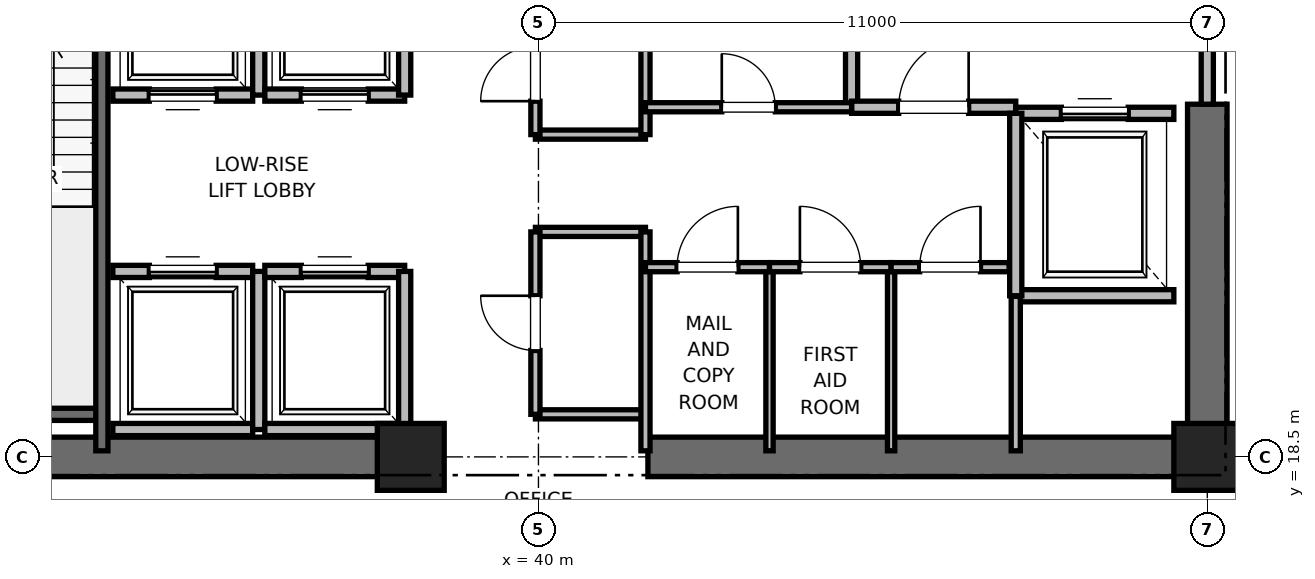
"""IFC4 building model, lengths in metres.
Left out: names, types, materials, properties, quantities, classifications, styles, units other than length and angle.
Written with IfcOpenShell. Run it as: python <this file> out.ifc"""

import sys

from ifc_helpers import new_model, si_unit, direction, frame, frame_2d, origin, origin_2d, place, context, subcontext, project, spatial, rectangle, extrude, element, fill, save


model = new_model("IFC4")
c1 = context("Model", 3, precision=1e-05, world=origin(), true_north=direction((0.0, 1.0)))
c2 = subcontext(c1, "Body", "Model", "MODEL_VIEW")
j1 = project(units=[si_unit("LENGTHUNIT", "METRE"), si_unit("PLANEANGLEUNIT", "RADIAN")], contexts=[c1])
p1 = place(None, origin())
s1 = spatial("IfcSite", under=j1, at=p1, CompositionType="ELEMENT")
p2 = place(p1, origin())
s2 = spatial("IfcBuilding", under=s1, at=p2, CompositionType="ELEMENT")
p3 = place(p2, frame((0.0, 0.0, 39.6)))
s3 = spatial("IfcBuildingStorey", under=s2, at=p3, CompositionType="ELEMENT", Elevation=39.6)
for number, where, z_axis, x_axis in (
    (1, (51.0, 18.5, 0.0), (0.0, 0.0, 1.0), (1.0, 0.0, 0.0)),
    (2, (37.9, 18.5, 0.0), (0.0, 0.0, 1.0), (1.0, 0.0, 0.0)),
):
    element("IfcColumn", number, at=place(p3, frame(where, z_axis=z_axis, x_axis=x_axis)), inside=s3, PredefinedType="PILASTER", context=c2, shape_type="SweptSolid", body=[
        extrude(rectangle(XDim=1.1, YDim=1.1, at=origin_2d()), origin(), (0.0, 0.0, 1.0), 4.0),
    ])
for number, where, z_axis, x_axis in (
    (3, (29.0, 18.5, 0.0), (0.0, 0.0, 1.0), (1.0, 0.0, 0.0)),
    (4, (41.8, 18.5, 0.0), (0.0, 0.0, 1.0), (1.0, 0.0, 0.0)),
):
    element("IfcWall", number, at=place(p3, frame(where, z_axis=z_axis, x_axis=x_axis)), inside=s3, PredefinedType="SHEAR", context=c2, shape_type="SweptSolid", body=[
        extrude(rectangle(XDim=9.2, YDim=0.65, at=frame_2d((4.6, 0.0))), origin(), (0.0, 0.0, 1.0), 3.76),
    ])
p4 = place(p3, frame((51.0, 18.5, 0.0), z_axis=(0.0, 0.0, 1.0), x_axis=(0.0, 1.0, 0.0)))
e5 = element("IfcWall", 5, at=p4, inside=s3, PredefinedType="SHEAR", context=c2, shape_type="SweptSolid", body=[
    extrude(rectangle(XDim=5.8, YDim=0.65, at=frame_2d((2.9, 0.0))), origin(), (0.0, 0.0, 1.0), 3.76),
])
p5 = place(p3, frame((29.7, 19.2, 0.0), z_axis=(0.0, 0.0, 1.0), x_axis=(1.0, 0.0, 0.0)))
e6 = element("IfcWall", 6, at=p5, inside=s3, PredefinedType="SOLIDWALL", context=c2, shape_type="SweptSolid", body=[
    extrude(rectangle(XDim=3.12, YDim=0.2, at=frame_2d((1.56, 0.0))), origin(), (0.0, 0.0, 1.0), 3.76),
])
p6 = place(p3, frame((32.82, 18.6, 0.0), z_axis=(0.0, 0.0, 1.0), x_axis=(0.0, 1.0, 0.0)))
e7 = element("IfcWall", 7, at=p6, inside=s3, PredefinedType="SOLIDWALL", context=c2, shape_type="SweptSolid", body=[
    extrude(rectangle(XDim=8.78, YDim=0.2, at=frame_2d((4.39, 0.0))), origin(), (0.0, 0.0, 1.0), 3.76),
])
p7 = place(p3, frame((45.15, 24.25, 0.0), z_axis=(0.0, 0.0, 1.0), x_axis=(0.0, 1.0, 0.0)))
e8 = element("IfcWall", 8, at=p7, inside=s3, PredefinedType="PARTITIONING", context=c2, shape_type="SweptSolid", body=[
    extrude(rectangle(XDim=3.37, YDim=0.2, at=frame_2d((1.685, 0.0))), origin(), (0.0, 0.0, 1.0), 3.76),
])
p8 = place(p3, frame((45.15, 24.25, 0.0), z_axis=(0.0, 0.0, 1.0), x_axis=(1.0, 0.0, 0.0)))
e9 = element("IfcWall", 9, at=p8, inside=s3, PredefinedType="PARTITIONING", context=c2, shape_type="SweptSolid", body=[
    extrude(rectangle(XDim=2.7, YDim=0.2, at=frame_2d((1.35, 0.0))), origin(), (0.0, 0.0, 1.0), 3.76),
])
p9 = place(p8, frame((0.775, 0.0, 0.0)))
e10 = element("IfcOpeningElement", 10, at=p9, cuts=e9, PredefinedType="OPENING", context=c2, shape_type="SweptSolid", body=[
    extrude(rectangle(XDim=1.15, YDim=2.2, at=frame_2d((0.575, 1.1))), frame((0.0, 0.1, 0.0), z_axis=(0.0, -1.0, 0.0), x_axis=(1.0, 0.0, 0.0)), (0.0, 0.0, 1.0), 0.2),
])
p10 = place(p3, frame((51.0, 24.3, 0.0), z_axis=(0.0, 0.0, 1.0), x_axis=(0.0, 1.0, 0.0)))
e11 = element("IfcWall", 11, at=p10, inside=s3, PredefinedType="PARTITIONING", context=c2, shape_type="SweptSolid", body=[
    extrude(rectangle(XDim=3.4, YDim=0.2, at=frame_2d((1.7, 0.0))), origin(), (0.0, 0.0, 1.0), 2.54),
])
p11 = place(p10, frame((1.125, 0.0, 0.0)))
e12 = element("IfcOpeningElement", 12, at=p11, cuts=e11, PredefinedType="OPENING", context=c2, shape_type="SweptSolid", body=[
    extrude(rectangle(XDim=1.15, YDim=2.2, at=frame_2d((0.575, 1.1))), frame((0.0, 0.1, 0.0), z_axis=(0.0, -1.0, 0.0), x_axis=(1.0, 0.0, 0.0)), (0.0, 0.0, 1.0), 0.2),
])
p12 = place(p3, frame((47.85, 21.15, 0.0), z_axis=(0.0, 0.0, 1.0), x_axis=(1.0, 0.0, 0.0)))
e13 = element("IfcWall", 13, at=p12, inside=s3, PredefinedType="SOLIDWALL", context=c2, shape_type="SweptSolid", body=[
    extrude(rectangle(XDim=2.6, YDim=0.2, at=frame_2d((1.3, 0.0))), origin(), (0.0, 0.0, 1.0), 3.76),
])
p13 = place(p3, frame((50.45, 24.15, 0.0), z_axis=(0.0, 0.0, 1.0), x_axis=(-1.0, 0.0, 0.0)))
e14 = element("IfcWall", 14, at=p13, inside=s3, PredefinedType="SOLIDWALL", context=c2, shape_type="SweptSolid", body=[
    extrude(rectangle(XDim=2.6, YDim=0.2, at=frame_2d((1.3, 0.0))), origin(), (0.0, 0.0, 1.0), 2.54),
])
p14 = place(p13, frame((0.75, 0.0, 0.0)))
e15 = element("IfcOpeningElement", 15, at=p14, cuts=e14, PredefinedType="OPENING", context=c2, shape_type="SweptSolid", body=[
    extrude(rectangle(XDim=1.1, YDim=2.2, at=frame_2d((0.55, 1.1))), frame((0.0, 0.1, 0.0), z_axis=(0.0, -1.0, 0.0), x_axis=(1.0, 0.0, 0.0)), (0.0, 0.0, 1.0), 0.2),
])
p15 = place(p3, frame((47.85, 24.15, 0.0), z_axis=(0.0, 0.0, 1.0), x_axis=(0.0, -1.0, 0.0)))
e16 = element("IfcWall", 16, at=p15, inside=s3, PredefinedType="SOLIDWALL", context=c2, shape_type="SweptSolid", body=[
    extrude(rectangle(XDim=3.0, YDim=0.2, at=frame_2d((1.5, 0.0))), origin(), (0.0, 0.0, 1.0), 3.76),
])
p16 = place(p3, frame((33.0, 18.95, 0.0), z_axis=(0.0, 0.0, 1.0), x_axis=(1.0, 0.0, 0.0)))
e17 = element("IfcWall", 17, at=p16, inside=s3, PredefinedType="SOLIDWALL", context=c2, shape_type="SweptSolid", body=[
    extrude(rectangle(XDim=2.3, YDim=0.2, at=frame_2d((1.15, 0.0))), origin(), (0.0, 0.0, 1.0), 3.76),
])
p17 = place(p3, frame((35.3, 21.55, 0.0), z_axis=(0.0, 0.0, 1.0), x_axis=(-1.0, 0.0, 0.0)))
e18 = element("IfcWall", 18, at=p17, inside=s3, PredefinedType="SOLIDWALL", context=c2, shape_type="SweptSolid", body=[
    extrude(rectangle(XDim=2.3, YDim=0.2, at=frame_2d((1.15, 0.0))), origin(), (0.0, 0.0, 1.0), 3.76),
])
p18 = place(p17, frame((0.6, 0.0, 0.0)))
e19 = element("IfcOpeningElement", 19, at=p18, cuts=e18, PredefinedType="OPENING", context=c2, shape_type="SweptSolid", body=[
    extrude(rectangle(XDim=1.1, YDim=2.2, at=frame_2d((0.55, 1.1))), frame((0.0, 0.1, 0.0), z_axis=(0.0, -1.0, 0.0), x_axis=(1.0, 0.0, 0.0)), (0.0, 0.0, 1.0), 0.2),
])
p19 = place(p3, frame((35.4, 18.95, 0.0), z_axis=(0.0, 0.0, 1.0), x_axis=(0.0, 1.0, 0.0)))
e20 = element("IfcWall", 20, at=p19, inside=s3, PredefinedType="SOLIDWALL", context=c2, shape_type="SweptSolid", body=[
    extrude(rectangle(XDim=2.6, YDim=0.2, at=frame_2d((1.3, 0.0))), origin(), (0.0, 0.0, 1.0), 3.76),
])
p20 = place(p3, frame((35.5, 18.95, 0.0), z_axis=(0.0, 0.0, 1.0), x_axis=(1.0, 0.0, 0.0)))
e21 = element("IfcWall", 21, at=p20, inside=s3, PredefinedType="SOLIDWALL", context=c2, shape_type="SweptSolid", body=[
    extrude(rectangle(XDim=2.3, YDim=0.2, at=frame_2d((1.15, 0.0))), origin(), (0.0, 0.0, 1.0), 2.54),
])
p21 = place(p3, frame((37.8, 21.55, 0.0), z_axis=(0.0, 0.0, 1.0), x_axis=(-1.0, 0.0, 0.0)))
e22 = element("IfcWall", 22, at=p21, inside=s3, PredefinedType="SOLIDWALL", context=c2, shape_type="SweptSolid", body=[
    extrude(rectangle(XDim=2.3, YDim=0.2, at=frame_2d((1.15, 0.0))), origin(), (0.0, 0.0, 1.0), 3.76),
])
p22 = place(p21, frame((0.6, 0.0, 0.0)))
e23 = element("IfcOpeningElement", 23, at=p22, cuts=e22, PredefinedType="OPENING", context=c2, shape_type="SweptSolid", body=[
    extrude(rectangle(XDim=1.1, YDim=2.2, at=frame_2d((0.55, 1.1))), frame((0.0, 0.1, 0.0), z_axis=(0.0, -1.0, 0.0), x_axis=(1.0, 0.0, 0.0)), (0.0, 0.0, 1.0), 0.2),
])
p23 = place(p3, frame((37.8, 18.95, 0.0), z_axis=(0.0, 0.0, 1.0), x_axis=(0.0, 1.0, 0.0)))
e24 = element("IfcWall", 24, at=p23, inside=s3, PredefinedType="SOLIDWALL", context=c2, shape_type="SweptSolid", body=[
    extrude(rectangle(XDim=2.6, YDim=0.2, at=frame_2d((1.3, 0.0))), origin(), (0.0, 0.0, 1.0), 2.54),
])
p24 = place(p3, frame((33.0, 24.45, 0.0), z_axis=(0.0, 0.0, 1.0), x_axis=(1.0, 0.0, 0.0)))
e25 = element("IfcWall", 25, at=p24, inside=s3, PredefinedType="SOLIDWALL", context=c2, shape_type="SweptSolid", body=[
    extrude(rectangle(XDim=2.3, YDim=0.2, at=frame_2d((1.15, 0.0))), origin(), (0.0, 0.0, 1.0), 3.76),
])
p25 = place(p24, frame((0.6, 0.0, 0.0)))
e26 = element("IfcOpeningElement", 26, at=p25, cuts=e25, PredefinedType="OPENING", context=c2, shape_type="SweptSolid", body=[
    extrude(rectangle(XDim=1.1, YDim=2.2, at=frame_2d((0.55, 1.1))), frame((0.0, 0.1, 0.0), z_axis=(0.0, -1.0, 0.0), x_axis=(1.0, 0.0, 0.0)), (0.0, 0.0, 1.0), 0.2),
])
p26 = place(p3, frame((35.4, 24.45, 0.0), z_axis=(0.0, 0.0, 1.0), x_axis=(0.0, 1.0, 0.0)))
e27 = element("IfcWall", 27, at=p26, inside=s3, PredefinedType="SOLIDWALL", context=c2, shape_type="SweptSolid", body=[
    extrude(rectangle(XDim=2.6, YDim=0.2, at=frame_2d((1.3, 0.0))), origin(), (0.0, 0.0, 1.0), 3.76),
])
p27 = place(p3, frame((35.5, 24.45, 0.0), z_axis=(0.0, 0.0, 1.0), x_axis=(1.0, 0.0, 0.0)))
e28 = element("IfcWall", 28, at=p27, inside=s3, PredefinedType="SOLIDWALL", context=c2, shape_type="SweptSolid", body=[
    extrude(rectangle(XDim=2.3, YDim=0.2, at=frame_2d((1.15, 0.0))), origin(), (0.0, 0.0, 1.0), 3.76),
])
p28 = place(p27, frame((0.6, 0.0, 0.0)))
e29 = element("IfcOpeningElement", 29, at=p28, cuts=e28, PredefinedType="OPENING", context=c2, shape_type="SweptSolid", body=[
    extrude(rectangle(XDim=1.1, YDim=2.2, at=frame_2d((0.55, 1.1))), frame((0.0, 0.1, 0.0), z_axis=(0.0, -1.0, 0.0), x_axis=(1.0, 0.0, 0.0)), (0.0, 0.0, 1.0), 0.2),
])
p29 = place(p3, frame((37.8, 24.45, 0.0), z_axis=(0.0, 0.0, 1.0), x_axis=(0.0, 1.0, 0.0)))
e30 = element("IfcWall", 30, at=p29, inside=s3, PredefinedType="SOLIDWALL", context=c2, shape_type="SweptSolid", body=[
    extrude(rectangle(XDim=2.6, YDim=0.2, at=frame_2d((1.3, 0.0))), origin(), (0.0, 0.0, 1.0), 3.76),
])
for number, where, z_axis, x_axis in (
    (31, (39.95, 19.2, 0.0), (0.0, 0.0, 1.0), (1.0, 0.0, 0.0)),
    (32, (39.95, 22.2, 0.0), (0.0, 0.0, 1.0), (1.0, 0.0, 0.0)),
    (33, (39.95, 23.8, 0.0), (0.0, 0.0, 1.0), (1.0, 0.0, 0.0)),
):
    element("IfcWall", number, at=place(p3, frame(where, z_axis=z_axis, x_axis=x_axis)), inside=s3, PredefinedType="PARTITIONING", context=c2, shape_type="SweptSolid", body=[
        extrude(rectangle(XDim=1.81, YDim=0.15, at=frame_2d((0.905, 0.0))), origin(), (0.0, 0.0, 1.0), 2.85),
    ])
p30 = place(p3, frame((41.76, 18.6, 0.0), z_axis=(0.0, 0.0, 1.0), x_axis=(0.0, 1.0, 0.0)))
e34 = element("IfcWall", 34, at=p30, inside=s3, PredefinedType="PARTITIONING", context=c2, shape_type="SweptSolid", body=[
    extrude(rectangle(XDim=3.6, YDim=0.15, at=frame_2d((1.8, 0.0))), origin(), (0.0, 0.0, 1.0), 2.54),
])
p31 = place(p3, frame((41.76, 23.8, 0.0), z_axis=(0.0, 0.0, 1.0), x_axis=(0.0, 1.0, 0.0)))
e35 = element("IfcWall", 35, at=p31, inside=s3, PredefinedType="PARTITIONING", context=c2, shape_type="SweptSolid", body=[
    extrude(rectangle(XDim=4.0, YDim=0.15, at=frame_2d((2.0, 0.0))), origin(), (0.0, 0.0, 1.0), 2.85),
])
p32 = place(p3, frame((39.95, 19.2, 0.0), z_axis=(0.0, 0.0, 1.0), x_axis=(0.0, 1.0, 0.0)))
e36 = element("IfcWall", 36, at=p32, inside=s3, PredefinedType="PARTITIONING", context=c2, shape_type="SweptSolid", body=[
    extrude(rectangle(XDim=3.0, YDim=0.15, at=frame_2d((1.5, 0.0))), origin(), (0.0, 0.0, 1.0), 2.85),
])
p33 = place(p32, frame((1.05, 0.0, 0.0)))
e37 = element("IfcOpeningElement", 37, at=p33, cuts=e36, PredefinedType="OPENING", context=c2, shape_type="SweptSolid", body=[
    extrude(rectangle(XDim=0.9, YDim=2.1, at=frame_2d((0.45, 1.05))), frame((0.0, 0.075, 0.0), z_axis=(0.0, -1.0, 0.0), x_axis=(1.0, 0.0, 0.0)), (0.0, 0.0, 1.0), 0.15),
])
p34 = place(p3, frame((39.95, 23.8, 0.0), z_axis=(0.0, 0.0, 1.0), x_axis=(0.0, 1.0, 0.0)))
e38 = element("IfcWall", 38, at=p34, inside=s3, PredefinedType="PARTITIONING", context=c2, shape_type="SweptSolid", body=[
    extrude(rectangle(XDim=2.0, YDim=0.15, at=frame_2d((1.0, 0.0))), origin(), (0.0, 0.0, 1.0), 2.85),
])
p35 = place(p34, frame((0.55, 0.0, 0.0)))
e39 = element("IfcOpeningElement", 39, at=p35, cuts=e38, PredefinedType="OPENING", context=c2, shape_type="SweptSolid", body=[
    extrude(rectangle(XDim=0.9, YDim=2.1, at=frame_2d((0.45, 1.05))), frame((0.0, 0.075, 0.0), z_axis=(0.0, -1.0, 0.0), x_axis=(1.0, 0.0, 0.0)), (0.0, 0.0, 1.0), 0.15),
])
p36 = place(p3, frame((47.85, 18.6, 0.0), z_axis=(0.0, 0.0, 1.0), x_axis=(0.0, 1.0, 0.0)))
e40 = element("IfcWall", 40, at=p36, inside=s3, PredefinedType="PARTITIONING", context=c2, shape_type="SweptSolid", body=[
    extrude(rectangle(XDim=2.54, YDim=0.15, at=frame_2d((1.27, 0.0))), origin(), (0.0, 0.0, 1.0), 2.85),
])
for number, where, z_axis, x_axis in (
    (41, (43.8, 18.6, 0.0), (0.0, 0.0, 1.0), (0.0, 1.0, 0.0)),
    (42, (45.8, 18.6, 0.0), (0.0, 0.0, 1.0), (0.0, 1.0, 0.0)),
):
    element("IfcWall", number, at=place(p3, frame(where, z_axis=z_axis, x_axis=x_axis)), inside=s3, PredefinedType="PARTITIONING", context=c2, shape_type="SweptSolid", body=[
        extrude(rectangle(XDim=3.02, YDim=0.12, at=frame_2d((1.51, 0.0))), origin(), (0.0, 0.0, 1.0), 2.85),
    ])
p37 = place(p3, frame((41.76, 21.62, 0.0), z_axis=(0.0, 0.0, 1.0), x_axis=(1.0, 0.0, 0.0)))
e43 = element("IfcWall", 43, at=p37, inside=s3, PredefinedType="PARTITIONING", context=c2, shape_type="SweptSolid", body=[
    extrude(rectangle(XDim=2.04, YDim=0.15, at=frame_2d((1.02, 0.0))), origin(), (0.0, 0.0, 1.0), 2.85),
])
p38 = place(p37, frame((0.52, 0.0, 0.0)))
e44 = element("IfcOpeningElement", 44, at=p38, cuts=e43, PredefinedType="OPENING", context=c2, shape_type="SweptSolid", body=[
    extrude(rectangle(XDim=1.0, YDim=2.15, at=frame_2d((0.5, 1.075))), frame((0.0, 0.075, 0.0), z_axis=(0.0, -1.0, 0.0), x_axis=(1.0, 0.0, 0.0)), (0.0, 0.0, 1.0), 0.15),
])
p39 = place(p3, frame((43.8, 21.62, 0.0), z_axis=(0.0, 0.0, 1.0), x_axis=(1.0, 0.0, 0.0)))
e45 = element("IfcWall", 45, at=p39, inside=s3, PredefinedType="PARTITIONING", context=c2, shape_type="SweptSolid", body=[
    extrude(rectangle(XDim=2.0, YDim=0.15, at=frame_2d((1.0, 0.0))), origin(), (0.0, 0.0, 1.0), 2.85),
])
p40 = place(p39, frame((0.5, 0.0, 0.0)))
e46 = element("IfcOpeningElement", 46, at=p40, cuts=e45, PredefinedType="OPENING", context=c2, shape_type="SweptSolid", body=[
    extrude(rectangle(XDim=1.0, YDim=2.15, at=frame_2d((0.5, 1.075))), frame((0.0, 0.075, 0.0), z_axis=(0.0, -1.0, 0.0), x_axis=(1.0, 0.0, 0.0)), (0.0, 0.0, 1.0), 0.15),
])
p41 = place(p3, frame((45.8, 21.62, 0.0), z_axis=(0.0, 0.0, 1.0), x_axis=(1.0, 0.0, 0.0)))
e47 = element("IfcWall", 47, at=p41, inside=s3, PredefinedType="PARTITIONING", context=c2, shape_type="SweptSolid", body=[
    extrude(rectangle(XDim=1.94, YDim=0.15, at=frame_2d((0.97, 0.0))), origin(), (0.0, 0.0, 1.0), 2.85),
])
p42 = place(p41, frame((0.47, 0.0, 0.0)))
e48 = element("IfcOpeningElement", 48, at=p42, cuts=e47, PredefinedType="OPENING", context=c2, shape_type="SweptSolid", body=[
    extrude(rectangle(XDim=1.0, YDim=2.15, at=frame_2d((0.5, 1.075))), frame((0.0, 0.075, 0.0), z_axis=(0.0, -1.0, 0.0), x_axis=(1.0, 0.0, 0.0)), (0.0, 0.0, 1.0), 0.15),
])
p43 = place(p3, frame((41.76, 24.25, 0.0), z_axis=(0.0, 0.0, 1.0), x_axis=(1.0, 0.0, 0.0)))
e49 = element("IfcWall", 49, at=p43, inside=s3, PredefinedType="PARTITIONING", context=c2, shape_type="SweptSolid", body=[
    extrude(rectangle(XDim=3.39, YDim=0.15, at=frame_2d((1.695, 0.0))), origin(), (0.0, 0.0, 1.0), 2.85),
])
p44 = place(p43, frame((1.255, 0.0, 0.0)))
e50 = element("IfcOpeningElement", 50, at=p44, cuts=e49, PredefinedType="OPENING", context=c2, shape_type="SweptSolid", body=[
    extrude(rectangle(XDim=0.88, YDim=2.1, at=frame_2d((0.44, 1.05))), frame((0.0, 0.075, 0.0), z_axis=(0.0, -1.0, 0.0), x_axis=(1.0, 0.0, 0.0)), (0.0, 0.0, 1.0), 0.15),
])
p45 = place(p9, origin())
e51 = element("IfcDoor", 51, at=p45, inside=s3, OperationType="SINGLE_SWING_RIGHT", PredefinedType="DOOR", context=c2, shape_type="SweptSolid", body=[
    extrude(rectangle(XDim=1.15, YDim=2.2, at=frame_2d((0.575, 1.1))), frame((0.0, 0.025, 0.0), z_axis=(0.0, -1.0, 0.0), x_axis=(1.0, 0.0, 0.0)), (0.0, 0.0, 1.0), 0.05),
])
fill(e10, e51)
p46 = place(p14, origin())
e52 = element("IfcDoor", 52, at=p46, inside=s3, OperationType="SLIDING_TO_RIGHT", PredefinedType="DOOR", context=c2, shape_type="SweptSolid", body=[
    extrude(rectangle(XDim=1.1, YDim=2.2, at=frame_2d((0.55, 1.1))), frame((0.0, 0.025, 0.0), z_axis=(0.0, -1.0, 0.0), x_axis=(1.0, 0.0, 0.0)), (0.0, 0.0, 1.0), 0.05),
])
fill(e15, e52)
p47 = place(p18, origin())
e53 = element("IfcDoor", 53, at=p47, inside=s3, OperationType="SLIDING_TO_RIGHT", PredefinedType="DOOR", context=c2, shape_type="SweptSolid", body=[
    extrude(rectangle(XDim=1.1, YDim=2.2, at=frame_2d((0.55, 1.1))), frame((0.0, 0.025, 0.0), z_axis=(0.0, -1.0, 0.0), x_axis=(1.0, 0.0, 0.0)), (0.0, 0.0, 1.0), 0.05),
])
fill(e19, e53)
p48 = place(p22, origin())
e54 = element("IfcDoor", 54, at=p48, inside=s3, OperationType="SLIDING_TO_RIGHT", PredefinedType="DOOR", context=c2, shape_type="SweptSolid", body=[
    extrude(rectangle(XDim=1.1, YDim=2.2, at=frame_2d((0.55, 1.1))), frame((0.0, 0.025, 0.0), z_axis=(0.0, -1.0, 0.0), x_axis=(1.0, 0.0, 0.0)), (0.0, 0.0, 1.0), 0.05),
])
fill(e23, e54)
p49 = place(p25, origin())
e55 = element("IfcDoor", 55, at=p49, inside=s3, OperationType="SLIDING_TO_RIGHT", PredefinedType="DOOR", context=c2, shape_type="SweptSolid", body=[
    extrude(rectangle(XDim=1.1, YDim=2.2, at=frame_2d((0.55, 1.1))), frame((0.0, 0.025, 0.0), z_axis=(0.0, -1.0, 0.0), x_axis=(1.0, 0.0, 0.0)), (0.0, 0.0, 1.0), 0.05),
])
fill(e26, e55)
p50 = place(p28, origin())
e56 = element("IfcDoor", 56, at=p50, inside=s3, OperationType="SLIDING_TO_RIGHT", PredefinedType="DOOR", context=c2, shape_type="SweptSolid", body=[
    extrude(rectangle(XDim=1.1, YDim=2.2, at=frame_2d((0.55, 1.1))), frame((0.0, 0.025, 0.0), z_axis=(0.0, -1.0, 0.0), x_axis=(1.0, 0.0, 0.0)), (0.0, 0.0, 1.0), 0.05),
])
fill(e29, e56)
p51 = place(p33, origin())
e57 = element("IfcDoor", 57, at=p51, inside=s3, OperationType="SINGLE_SWING_RIGHT", PredefinedType="DOOR", context=c2, shape_type="SweptSolid", body=[
    extrude(rectangle(XDim=0.9, YDim=2.1, at=frame_2d((0.45, 1.05))), frame((0.0, 0.025, 0.0), z_axis=(0.0, -1.0, 0.0), x_axis=(1.0, 0.0, 0.0)), (0.0, 0.0, 1.0), 0.05),
])
fill(e37, e57)
p52 = place(p35, origin())
e58 = element("IfcDoor", 58, at=p52, inside=s3, OperationType="SINGLE_SWING_LEFT", PredefinedType="DOOR", context=c2, shape_type="SweptSolid", body=[
    extrude(rectangle(XDim=0.9, YDim=2.1, at=frame_2d((0.45, 1.05))), frame((0.0, 0.025, 0.0), z_axis=(0.0, -1.0, 0.0), x_axis=(1.0, 0.0, 0.0)), (0.0, 0.0, 1.0), 0.05),
])
fill(e39, e58)
p53 = place(p38, origin())
e59 = element("IfcDoor", 59, at=p53, inside=s3, OperationType="SINGLE_SWING_RIGHT", PredefinedType="DOOR", context=c2, shape_type="SweptSolid", body=[
    extrude(rectangle(XDim=1.0, YDim=2.15, at=frame_2d((0.5, 1.075))), frame((0.0, 0.025, 0.0), z_axis=(0.0, -1.0, 0.0), x_axis=(1.0, 0.0, 0.0)), (0.0, 0.0, 1.0), 0.05),
])
fill(e44, e59)
p54 = place(p40, origin())
e60 = element("IfcDoor", 60, at=p54, inside=s3, OperationType="SINGLE_SWING_LEFT", PredefinedType="DOOR", context=c2, shape_type="SweptSolid", body=[
    extrude(rectangle(XDim=1.0, YDim=2.15, at=frame_2d((0.5, 1.075))), frame((0.0, 0.025, 0.0), z_axis=(0.0, -1.0, 0.0), x_axis=(1.0, 0.0, 0.0)), (0.0, 0.0, 1.0), 0.05),
])
fill(e46, e60)
p55 = place(p42, origin())
e61 = element("IfcDoor", 61, at=p55, inside=s3, OperationType="SINGLE_SWING_RIGHT", PredefinedType="DOOR", context=c2, shape_type="SweptSolid", body=[
    extrude(rectangle(XDim=1.0, YDim=2.15, at=frame_2d((0.5, 1.075))), frame((0.0, 0.025, 0.0), z_axis=(0.0, -1.0, 0.0), x_axis=(1.0, 0.0, 0.0)), (0.0, 0.0, 1.0), 0.05),
])
fill(e48, e61)
p56 = place(p44, origin())
e62 = element("IfcDoor", 62, at=p56, inside=s3, OperationType="SINGLE_SWING_LEFT", PredefinedType="DOOR", context=c2, shape_type="SweptSolid", body=[
    extrude(rectangle(XDim=0.88, YDim=2.1, at=frame_2d((0.44, 1.05))), frame((0.0, 0.025, 0.0), z_axis=(0.0, -1.0, 0.0), x_axis=(1.0, 0.0, 0.0)), (0.0, 0.0, 1.0), 0.05),
])
fill(e50, e62)
save(model, sys.argv[1])
